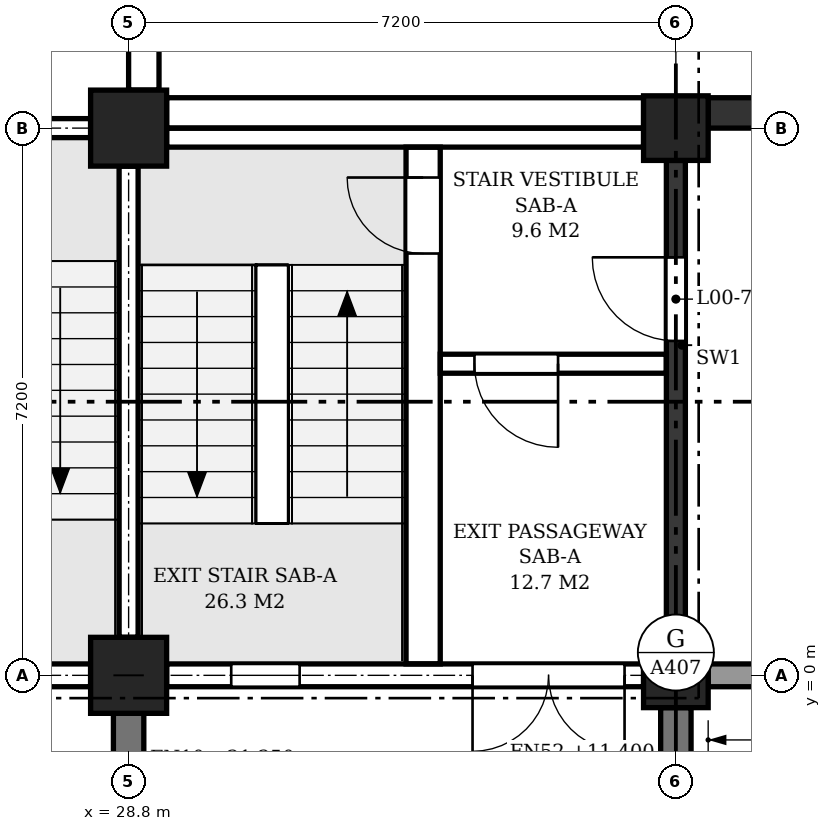
"""IFC4 building model, lengths in metres.
Left out: names, types, materials, properties, quantities, classifications, styles, units other than length and angle.
Written with IfcOpenShell. Run it as: python <this file> out.ifc"""

import sys

from ifc_helpers import new_model, si_unit, direction, frame, frame_2d, origin, origin_2d, place, context, subcontext, project, spatial, polyline, rectangle, outline, extrude, element, fill, save


model = new_model("IFC4")
c1 = context("Model", 3, precision=1e-05, world=origin(), true_north=direction((0.0, 1.0)))
c2 = subcontext(c1, "Body", "Model", "MODEL_VIEW")
j1 = project(units=[si_unit("LENGTHUNIT", "METRE"), si_unit("PLANEANGLEUNIT", "RADIAN")], contexts=[c1])
p1 = place(None, origin())
s1 = spatial("IfcSite", under=j1, at=p1, CompositionType="ELEMENT")
p2 = place(p1, origin())
s2 = spatial("IfcBuilding", under=s1, at=p2, CompositionType="ELEMENT")
p3 = place(p2, origin())
s3 = spatial("IfcBuildingStorey", under=s2, at=p3, CompositionType="ELEMENT", Elevation=0.0)
for number, where, z_axis, x_axis in (
    (1, (28.8, 0.0, 0.0), (0.0, 0.0, 1.0), (1.0, 0.0, 0.0)),
    (2, (28.8, 7.2, 0.0), (0.0, 0.0, 1.0), (1.0, 0.0, 0.0)),
):
    element("IfcColumn", number, at=place(p3, frame(where, z_axis=z_axis, x_axis=x_axis)), inside=s3, PredefinedType="COLUMN", context=c2, shape_type="SweptSolid", body=[
        extrude(rectangle(XDim=1.0, YDim=1.0, at=origin_2d()), origin(), (0.0, 0.0, 1.0), 6.0),
    ])
for number, where, z_axis, x_axis in (
    (3, (36.0, 0.0, 0.0), (0.0, 0.0, 1.0), (1.0, 0.0, 0.0)),
    (4, (36.0, 7.2, 0.0), (0.0, 0.0, 1.0), (1.0, 0.0, 0.0)),
):
    element("IfcColumn", number, at=place(p3, frame(where, z_axis=z_axis, x_axis=x_axis)), inside=s3, PredefinedType="COLUMN", context=c2, shape_type="SweptSolid", body=[
        extrude(rectangle(XDim=0.85, YDim=0.85, at=origin_2d()), origin(), (0.0, 0.0, 1.0), 6.0),
    ])
p4 = place(p3, frame((22.1, 0.0, 0.0), z_axis=(0.0, 0.0, 1.0), x_axis=(1.0, 0.0, 0.0)))
e5 = element("IfcWall", 5, at=p4, inside=s3, PredefinedType="STANDARD", context=c2, shape_type="SweptSolid", body=[
    extrude(rectangle(XDim=6.2, YDim=0.3, at=frame_2d((3.1, 0.0))), origin(), (0.0, 0.0, 1.0), 5.15),
])
p5 = place(p4, frame((0.25, 0.0, 0.0)))
e6 = element("IfcOpeningElement", 6, at=p5, cuts=e5, PredefinedType="OPENING", context=c2, shape_type="SweptSolid", body=[
    extrude(rectangle(XDim=2.0, YDim=2.1, at=frame_2d((1.0, 1.05))), frame((0.0, 0.16, 0.0), z_axis=(0.0, -1.0, 0.0), x_axis=(1.0, 0.0, 0.0)), (0.0, 0.0, 1.0), 0.32),
])
p6 = place(p4, frame((4.45, 0.0, 0.9)))
e7 = element("IfcOpeningElement", 7, at=p6, cuts=e5, PredefinedType="OPENING", context=c2, shape_type="SweptSolid", body=[
    extrude(outline(polyline([(0.0, 0.0), (0.9, 0.0), (0.9, 3.55), (0.45, 4.0), (0.0, 3.55), (0.0, 0.0)])), frame((0.0, 0.16, 0.0), z_axis=(0.0, -1.0, 0.0), x_axis=(1.0, 0.0, 0.0)), (0.0, 0.0, 1.0), 0.32),
])
p7 = place(p3, frame((29.3, 0.0, 0.0), z_axis=(0.0, 0.0, 1.0), x_axis=(1.0, 0.0, 0.0)))
e8 = element("IfcWall", 8, at=p7, inside=s3, PredefinedType="STANDARD", context=c2, shape_type="SweptSolid", body=[
    extrude(rectangle(XDim=6.275, YDim=0.3, at=frame_2d((3.137, 0.0))), origin(), (0.0, 0.0, 1.0), 5.15),
])
p8 = place(p7, frame((4.025, 0.0, 0.0)))
e9 = element("IfcOpeningElement", 9, at=p8, cuts=e8, PredefinedType="OPENING", context=c2, shape_type="SweptSolid", body=[
    extrude(rectangle(XDim=2.0, YDim=2.1, at=frame_2d((1.0, 1.05))), frame((0.0, 0.16, 0.0), z_axis=(0.0, -1.0, 0.0), x_axis=(1.0, 0.0, 0.0)), (0.0, 0.0, 1.0), 0.32),
])
p9 = place(p7, frame((0.85, 0.0, 0.9)))
e10 = element("IfcOpeningElement", 10, at=p9, cuts=e8, PredefinedType="OPENING", context=c2, shape_type="SweptSolid", body=[
    extrude(outline(polyline([(0.0, 0.0), (0.9, 0.0), (0.9, 3.55), (0.45, 4.0), (0.0, 3.55), (0.0, 0.0)])), frame((0.0, 0.16, 0.0), z_axis=(0.0, -1.0, 0.0), x_axis=(1.0, 0.0, 0.0)), (0.0, 0.0, 1.0), 0.32),
])
p10 = place(p3, frame((36.425, 0.0, 0.0), z_axis=(0.0, 0.0, 1.0), x_axis=(1.0, 0.0, 0.0)))
e11 = element("IfcWall", 11, at=p10, inside=s3, PredefinedType="STANDARD", context=c2, shape_type="SweptSolid", body=[
    extrude(rectangle(XDim=6.35, YDim=0.3, at=frame_2d((3.175, 0.0))), origin(), (0.0, 0.0, 1.0), 5.15),
])
p11 = place(p10, frame((1.975, 0.0, 0.0)))
e12 = element("IfcOpeningElement", 12, at=p11, cuts=e11, PredefinedType="OPENING", context=c2, shape_type="SweptSolid", body=[
    extrude(outline(polyline([(0.0, 0.0), (2.4, 0.0), (2.4, 2.0), (1.2, 3.2), (0.0, 2.0), (0.0, 0.0)])), frame((0.0, 0.16, 0.0), z_axis=(0.0, -1.0, 0.0), x_axis=(1.0, 0.0, 0.0)), (0.0, 0.0, 1.0), 0.32),
])
p12 = place(p3, frame((28.8, -0.5, 0.0), z_axis=(0.0, 0.0, 1.0), x_axis=(0.0, -1.0, 0.0)))
e13 = element("IfcWall", 13, at=p12, inside=s3, PredefinedType="POLYGONAL", context=c2, shape_type="SweptSolid", body=[
    extrude(outline(polyline([(1.2, 0.0), (1.2, 20.825), (0.85, 21.35), (0.0, 21.35), (0.0, 0.0), (1.2, 0.0)])), frame((0.0, 0.2, 0.0), z_axis=(0.0, -1.0, 0.0), x_axis=(1.0, 0.0, 0.0)), (0.0, 0.0, 1.0), 0.4),
])
p13 = place(p3, frame((36.0, -0.425, 0.0), z_axis=(0.0, 0.0, 1.0), x_axis=(0.0, -1.0, 0.0)))
e14 = element("IfcWall", 14, at=p13, inside=s3, PredefinedType="POLYGONAL", context=c2, shape_type="SweptSolid", body=[
    extrude(outline(polyline([(1.2, 0.0), (1.2, 9.825), (0.15, 11.4), (0.0, 11.4), (0.0, 0.0), (1.2, 0.0)])), frame((0.0, 0.2, 0.0), z_axis=(0.0, -1.0, 0.0), x_axis=(1.0, 0.0, 0.0)), (0.0, 0.0, 1.0), 0.4),
])
p14 = place(p3, frame((29.3, 7.075, 0.0), z_axis=(0.0, 0.0, 1.0), x_axis=(1.0, 0.0, 0.0)))
e15 = element("IfcWall", 15, at=p14, inside=s3, PredefinedType="SHEAR", context=c2, shape_type="SweptSolid", body=[
    extrude(rectangle(XDim=6.275, YDim=0.25, at=frame_2d((3.137, 0.0))), origin(), (0.0, 0.0, 1.0), 5.05),
])
p15 = place(p3, frame((28.8, 0.5, -0.3), z_axis=(0.0, 0.0, 1.0), x_axis=(0.0, 1.0, 0.0)))
e16 = element("IfcWall", 16, at=p15, inside=s3, PredefinedType="SHEAR", context=c2, shape_type="SweptSolid", body=[
    extrude(rectangle(XDim=6.2, YDim=0.25, at=frame_2d((3.1, 0.0))), origin(), (0.0, 0.0, 1.0), 5.3),
])
p16 = place(p3, frame((36.0, 0.425, 0.0), z_axis=(0.0, 0.0, 1.0), x_axis=(0.0, 1.0, 0.0)))
e17 = element("IfcWall", 17, at=p16, inside=s3, PredefinedType="SHEAR", context=c2, shape_type="SweptSolid", body=[
    extrude(rectangle(XDim=6.35, YDim=0.25, at=frame_2d((3.175, 0.0))), origin(), (0.0, 0.0, 1.0), 5.0),
])
p17 = place(p16, frame((3.975, 0.0, 0.0)))
e18 = element("IfcOpeningElement", 18, at=p17, cuts=e17, PredefinedType="OPENING", context=c2, shape_type="SweptSolid", body=[
    extrude(rectangle(XDim=1.1, YDim=2.1, at=frame_2d((0.55, 1.05))), frame((0.0, 0.135, 0.0), z_axis=(0.0, -1.0, 0.0), x_axis=(1.0, 0.0, 0.0)), (0.0, 0.0, 1.0), 0.27),
])
p18 = place(p3, frame((32.675, 0.15, 0.0), z_axis=(0.0, 0.0, 1.0), x_axis=(0.0, 1.0, 0.0)))
e19 = element("IfcWall", 19, at=p18, inside=s3, PredefinedType="SHEAR", context=c2, shape_type="SweptSolid", body=[
    extrude(rectangle(XDim=6.8, YDim=0.45, at=frame_2d((3.4, 0.0))), origin(), (0.0, 0.0, 1.0), 5.75),
])
p19 = place(p18, frame((5.4, 0.0, 0.0)))
e20 = element("IfcOpeningElement", 20, at=p19, cuts=e19, PredefinedType="OPENING", context=c2, shape_type="SweptSolid", body=[
    extrude(rectangle(XDim=1.0, YDim=2.1, at=frame_2d((0.5, 1.05))), frame((0.0, 0.235, 0.0), z_axis=(0.0, -1.0, 0.0), x_axis=(1.0, 0.0, 0.0)), (0.0, 0.0, 1.0), 0.47),
])
p20 = place(p3, frame((32.9, 4.1, 0.0), z_axis=(0.0, 0.0, 1.0), x_axis=(1.0, 0.0, 0.0)))
e21 = element("IfcWall", 21, at=p20, inside=s3, PredefinedType="SHEAR", context=c2, shape_type="SweptSolid", body=[
    extrude(rectangle(XDim=2.975, YDim=0.25, at=frame_2d((1.488, 0.0))), origin(), (0.0, 0.0, 1.0), 5.75),
])
p21 = place(p20, frame((0.45, 0.0, 0.0)))
e22 = element("IfcOpeningElement", 22, at=p21, cuts=e21, PredefinedType="OPENING", context=c2, shape_type="SweptSolid", body=[
    extrude(rectangle(XDim=1.1, YDim=2.1, at=frame_2d((0.55, 1.05))), frame((0.0, 0.135, 0.0), z_axis=(0.0, -1.0, 0.0), x_axis=(1.0, 0.0, 0.0)), (0.0, 0.0, 1.0), 0.27),
])
p22 = place(p3, frame((22.1, 7.2, 0.0), z_axis=(0.0, 0.0, 1.0), x_axis=(1.0, 0.0, 0.0)))
e23 = element("IfcWall", 23, at=p22, inside=s3, PredefinedType="SHEAR", context=c2, shape_type="SweptSolid", body=[
    extrude(rectangle(XDim=6.2, YDim=0.25, at=frame_2d((3.1, 0.0))), origin(), (0.0, 0.0, 1.0), 5.0),
])
p23 = place(p22, frame((0.35, 0.0, 0.0)))
e24 = element("IfcOpeningElement", 24, at=p23, cuts=e23, PredefinedType="OPENING", context=c2, shape_type="SweptSolid", body=[
    extrude(rectangle(XDim=1.1, YDim=2.1, at=frame_2d((0.55, 1.05))), frame((0.0, 0.135, 0.0), z_axis=(0.0, -1.0, 0.0), x_axis=(1.0, 0.0, 0.0)), (0.0, 0.0, 1.0), 0.27),
])
p24 = place(p3, frame((29.3, 7.4, 0.0), z_axis=(0.0, 0.0, 1.0), x_axis=(1.0, 0.0, 0.0)))
e25 = element("IfcWall", 25, at=p24, inside=s3, PredefinedType="SOLIDWALL", context=c2, shape_type="SweptSolid", body=[
    extrude(rectangle(XDim=6.275, YDim=0.4, at=frame_2d((3.137, 0.0))), origin(), (0.0, 0.0, 1.0), 10.7),
])
p25 = place(p3, frame((36.425, 7.4, 0.0), z_axis=(0.0, 0.0, 1.0), x_axis=(1.0, 0.0, 0.0)))
e26 = element("IfcWall", 26, at=p25, inside=s3, PredefinedType="SOLIDWALL", context=c2, shape_type="SweptSolid", body=[
    extrude(rectangle(XDim=6.35, YDim=0.4, at=frame_2d((3.175, 0.0))), origin(), (0.0, 0.0, 1.0), 10.7),
])
p26 = place(p3, frame((29.0, 7.7, 0.0), z_axis=(0.0, 0.0, 1.0), x_axis=(0.0, 1.0, 0.0)))
e27 = element("IfcWall", 27, at=p26, inside=s3, PredefinedType="SOLIDWALL", context=c2, shape_type="SweptSolid", body=[
    extrude(rectangle(XDim=6.2, YDim=0.4, at=frame_2d((3.1, 0.0))), origin(), (0.0, 0.0, 1.0), 10.55),
])
p27 = place(p8, frame((2.0, 0.0, 0.0), z_axis=(0.0, 0.0, 1.0), x_axis=(-1.0, 0.0, 0.0)))
e28 = element("IfcDoor", 28, at=p27, inside=s3, OperationType="DOUBLE_DOOR_SINGLE_SWING", PredefinedType="DOOR", context=c2, shape_type="SweptSolid", body=[
    extrude(rectangle(XDim=2.0, YDim=2.1, at=frame_2d((1.0, 1.05))), frame((0.0, 0.025, 0.0), z_axis=(0.0, -1.0, 0.0), x_axis=(1.0, 0.0, 0.0)), (0.0, 0.0, 1.0), 0.05),
])
fill(e9, e28)
p28 = place(p9, origin())
e29 = element("IfcWindow", 29, at=p28, inside=s3, PartitioningType="SINGLE_PANEL", PredefinedType="WINDOW", context=c2, shape_type="SweptSolid", body=[
    extrude(outline(polyline([(0.0, 0.0), (0.9, 0.0), (0.9, 3.55), (0.45, 4.0), (0.0, 3.55), (0.0, 0.0)])), frame((0.0, 0.03, 0.0), z_axis=(0.0, -1.0, 0.0), x_axis=(1.0, 0.0, 0.0)), (0.0, 0.0, 1.0), 0.06),
])
fill(e10, e29)
p29 = place(p19, origin())
e30 = element("IfcDoor", 30, at=p29, inside=s3, OperationType="SINGLE_SWING_RIGHT", PredefinedType="DOOR", context=c2, shape_type="SweptSolid", body=[
    extrude(rectangle(XDim=1.0, YDim=2.1, at=frame_2d((0.5, 1.05))), frame((0.0, 0.025, 0.0), z_axis=(0.0, -1.0, 0.0), x_axis=(1.0, 0.0, 0.0)), (0.0, 0.0, 1.0), 0.05),
])
fill(e20, e30)
p30 = place(p17, origin())
e31 = element("IfcDoor", 31, at=p30, inside=s3, OperationType="SINGLE_SWING_RIGHT", PredefinedType="DOOR", context=c2, shape_type="SweptSolid", body=[
    extrude(rectangle(XDim=1.1, YDim=2.1, at=frame_2d((0.55, 1.05))), frame((0.0, 0.025, 0.0), z_axis=(0.0, -1.0, 0.0), x_axis=(1.0, 0.0, 0.0)), (0.0, 0.0, 1.0), 0.05),
])
fill(e18, e31)
p31 = place(p21, frame((1.1, 0.0, 0.0), z_axis=(0.0, 0.0, 1.0), x_axis=(-1.0, 0.0, 0.0)))
e32 = element("IfcDoor", 32, at=p31, inside=s3, OperationType="SINGLE_SWING_LEFT", PredefinedType="DOOR", context=c2, shape_type="SweptSolid", body=[
    extrude(rectangle(XDim=1.1, YDim=2.1, at=frame_2d((0.55, 1.05))), frame((0.0, 0.025, 0.0), z_axis=(0.0, -1.0, 0.0), x_axis=(1.0, 0.0, 0.0)), (0.0, 0.0, 1.0), 0.05),
])
fill(e22, e32)
save(model, sys.argv[1])
